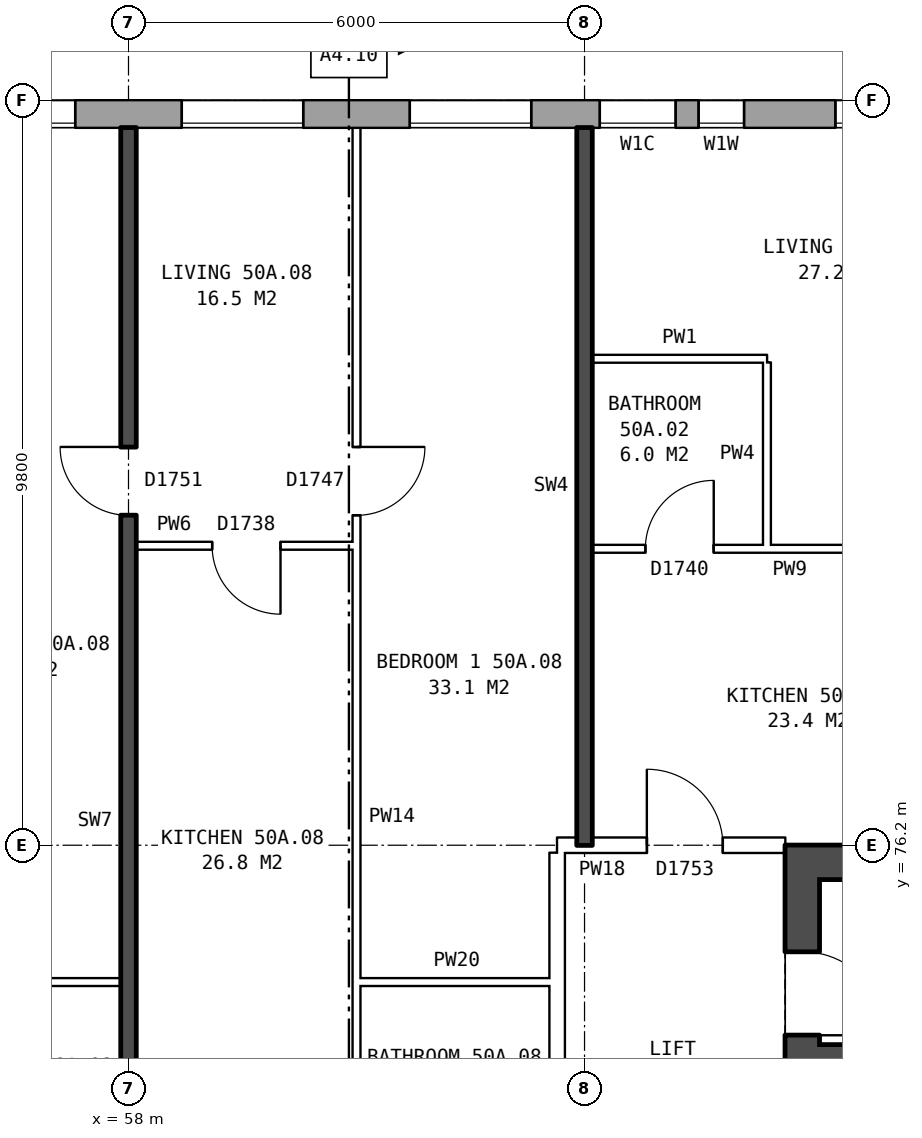
"""IFC4 building model, lengths in metres.
Left out: names, types, materials, properties, quantities, classifications, styles, units other than length and angle.
Written with IfcOpenShell. Run it as: python <this file> out.ifc"""

import sys

from ifc_helpers import new_model, si_unit, direction, frame, frame_2d, origin, place, context, subcontext, project, spatial, rectangle, extrude, element, fill, save


model = new_model("IFC4")
c1 = context("Model", 3, precision=1e-05, world=origin(), true_north=direction((0.0, 1.0)))
c2 = subcontext(c1, "Body", "Model", "MODEL_VIEW")
j1 = project(units=[si_unit("LENGTHUNIT", "METRE"), si_unit("PLANEANGLEUNIT", "RADIAN")], contexts=[c1])
p1 = place(None, origin())
s1 = spatial("IfcSite", under=j1, at=p1, CompositionType="ELEMENT")
p2 = place(p1, origin())
s2 = spatial("IfcBuilding", under=s1, at=p2, CompositionType="ELEMENT")
p3 = place(p2, frame((0.0, 0.0, 178.9)))
s3 = spatial("IfcBuildingStorey", under=s2, at=p3, CompositionType="ELEMENT", Elevation=178.9)
p4 = place(p3, frame((72.925, 85.82, 0.0), z_axis=(0.0, 0.0, 1.0), x_axis=(-1.0, 0.0, 0.0)))
e1 = element("IfcWall", 1, at=p4, inside=s3, PredefinedType="STANDARD", context=c2, shape_type="SweptSolid", body=[
    extrude(rectangle(XDim=39.601, YDim=0.36, at=frame_2d((19.8, 0.0))), origin(), (0.0, 0.0, 1.0), 2.85),
])
p5 = place(p4, frame((0.625, 0.0, 0.8)))
e2 = element("IfcOpeningElement", 2, at=p5, cuts=e1, PredefinedType="OPENING", context=c2, shape_type="SweptSolid", body=[
    extrude(rectangle(XDim=1.6, YDim=1.8, at=frame_2d((0.8, 0.9))), frame((0.0, 0.19, 0.0), z_axis=(0.0, -1.0, 0.0), x_axis=(1.0, 0.0, 0.0)), (0.0, 0.0, 1.0), 0.38),
])
p6 = place(p4, frame((3.125, 0.0, 0.8)))
e3 = element("IfcOpeningElement", 3, at=p6, cuts=e1, PredefinedType="OPENING", context=c2, shape_type="SweptSolid", body=[
    extrude(rectangle(XDim=1.6, YDim=1.8, at=frame_2d((0.8, 0.9))), frame((0.0, 0.19, 0.0), z_axis=(0.0, -1.0, 0.0), x_axis=(1.0, 0.0, 0.0)), (0.0, 0.0, 1.0), 0.38),
])
p7 = place(p4, frame((5.025, 0.0, 1.7)))
e4 = element("IfcOpeningElement", 4, at=p7, cuts=e1, PredefinedType="OPENING", context=c2, shape_type="SweptSolid", body=[
    extrude(rectangle(XDim=0.6, YDim=0.9, at=frame_2d((0.3, 0.45))), frame((0.0, 0.19, 0.0), z_axis=(0.0, -1.0, 0.0), x_axis=(1.0, 0.0, 0.0)), (0.0, 0.0, 1.0), 0.38),
])
p8 = place(p4, frame((9.625, 0.0, 0.8)))
e5 = element("IfcOpeningElement", 5, at=p8, cuts=e1, PredefinedType="OPENING", context=c2, shape_type="SweptSolid", body=[
    extrude(rectangle(XDim=1.6, YDim=1.8, at=frame_2d((0.8, 0.9))), frame((0.0, 0.19, 0.0), z_axis=(0.0, -1.0, 0.0), x_axis=(1.0, 0.0, 0.0)), (0.0, 0.0, 1.0), 0.38),
])
p9 = place(p4, frame((12.625, 0.0, 0.8)))
e6 = element("IfcOpeningElement", 6, at=p9, cuts=e1, PredefinedType="OPENING", context=c2, shape_type="SweptSolid", body=[
    extrude(rectangle(XDim=1.6, YDim=1.8, at=frame_2d((0.8, 0.9))), frame((0.0, 0.19, 0.0), z_axis=(0.0, -1.0, 0.0), x_axis=(1.0, 0.0, 0.0)), (0.0, 0.0, 1.0), 0.38),
])
p10 = place(p4, frame((15.625, 0.0, 0.8)))
e7 = element("IfcOpeningElement", 7, at=p10, cuts=e1, PredefinedType="OPENING", context=c2, shape_type="SweptSolid", body=[
    extrude(rectangle(XDim=1.6, YDim=1.8, at=frame_2d((0.8, 0.9))), frame((0.0, 0.19, 0.0), z_axis=(0.0, -1.0, 0.0), x_axis=(1.0, 0.0, 0.0)), (0.0, 0.0, 1.0), 0.38),
])
p11 = place(p4, frame((18.625, 0.0, 0.8)))
e8 = element("IfcOpeningElement", 8, at=p11, cuts=e1, PredefinedType="OPENING", context=c2, shape_type="SweptSolid", body=[
    extrude(rectangle(XDim=1.6, YDim=1.8, at=frame_2d((0.8, 0.9))), frame((0.0, 0.19, 0.0), z_axis=(0.0, -1.0, 0.0), x_axis=(1.0, 0.0, 0.0)), (0.0, 0.0, 1.0), 0.38),
])
p12 = place(p4, frame((21.625, 0.0, 0.8)))
e9 = element("IfcOpeningElement", 9, at=p12, cuts=e1, PredefinedType="OPENING", context=c2, shape_type="SweptSolid", body=[
    extrude(rectangle(XDim=1.6, YDim=1.8, at=frame_2d((0.8, 0.9))), frame((0.0, 0.19, 0.0), z_axis=(0.0, -1.0, 0.0), x_axis=(1.0, 0.0, 0.0)), (0.0, 0.0, 1.0), 0.38),
])
p13 = place(p4, frame((24.625, 0.0, 0.8)))
e10 = element("IfcOpeningElement", 10, at=p13, cuts=e1, PredefinedType="OPENING", context=c2, shape_type="SweptSolid", body=[
    extrude(rectangle(XDim=1.6, YDim=1.8, at=frame_2d((0.8, 0.9))), frame((0.0, 0.19, 0.0), z_axis=(0.0, -1.0, 0.0), x_axis=(1.0, 0.0, 0.0)), (0.0, 0.0, 1.0), 0.38),
])
p14 = place(p4, frame((27.625, 0.0, 0.8)))
e11 = element("IfcOpeningElement", 11, at=p14, cuts=e1, PredefinedType="OPENING", context=c2, shape_type="SweptSolid", body=[
    extrude(rectangle(XDim=1.6, YDim=1.8, at=frame_2d((0.8, 0.9))), frame((0.0, 0.19, 0.0), z_axis=(0.0, -1.0, 0.0), x_axis=(1.0, 0.0, 0.0)), (0.0, 0.0, 1.0), 0.38),
])
p15 = place(p4, frame((30.625, 0.0, 0.8)))
e12 = element("IfcOpeningElement", 12, at=p15, cuts=e1, PredefinedType="OPENING", context=c2, shape_type="SweptSolid", body=[
    extrude(rectangle(XDim=1.6, YDim=1.8, at=frame_2d((0.8, 0.9))), frame((0.0, 0.19, 0.0), z_axis=(0.0, -1.0, 0.0), x_axis=(1.0, 0.0, 0.0)), (0.0, 0.0, 1.0), 0.38),
])
p16 = place(p4, frame((33.925, 0.0, 1.7)))
e13 = element("IfcOpeningElement", 13, at=p16, cuts=e1, PredefinedType="OPENING", context=c2, shape_type="SweptSolid", body=[
    extrude(rectangle(XDim=0.6, YDim=0.9, at=frame_2d((0.3, 0.45))), frame((0.0, 0.19, 0.0), z_axis=(0.0, -1.0, 0.0), x_axis=(1.0, 0.0, 0.0)), (0.0, 0.0, 1.0), 0.38),
])
p17 = place(p4, frame((36.625, 0.0, 0.8)))
e14 = element("IfcOpeningElement", 14, at=p17, cuts=e1, PredefinedType="OPENING", context=c2, shape_type="SweptSolid", body=[
    extrude(rectangle(XDim=1.6, YDim=1.8, at=frame_2d((0.8, 0.9))), frame((0.0, 0.19, 0.0), z_axis=(0.0, -1.0, 0.0), x_axis=(1.0, 0.0, 0.0)), (0.0, 0.0, 1.0), 0.38),
])
p18 = place(p4, frame((6.825, 0.0, 0.8)))
e15 = element("IfcOpeningElement", 15, at=p18, cuts=e1, PredefinedType="OPENING", context=c2, shape_type="SweptSolid", body=[
    extrude(rectangle(XDim=0.6, YDim=0.9, at=frame_2d((0.3, 0.45))), frame((0.0, 0.19, 0.0), z_axis=(0.0, -1.0, 0.0), x_axis=(1.0, 0.0, 0.0)), (0.0, 0.0, 1.0), 0.38),
])
p19 = place(p4, frame((7.725, 0.0, 0.8)))
e16 = element("IfcOpeningElement", 16, at=p19, cuts=e1, PredefinedType="OPENING", context=c2, shape_type="SweptSolid", body=[
    extrude(rectangle(XDim=1.0, YDim=1.8, at=frame_2d((0.5, 0.9))), frame((0.0, 0.19, 0.0), z_axis=(0.0, -1.0, 0.0), x_axis=(1.0, 0.0, 0.0)), (0.0, 0.0, 1.0), 0.38),
])
p20 = place(p4, frame((34.825, 0.0, 0.8)))
e17 = element("IfcOpeningElement", 17, at=p20, cuts=e1, PredefinedType="OPENING", context=c2, shape_type="SweptSolid", body=[
    extrude(rectangle(XDim=1.4, YDim=1.8, at=frame_2d((0.7, 0.9))), frame((0.0, 0.19, 0.0), z_axis=(0.0, -1.0, 0.0), x_axis=(1.0, 0.0, 0.0)), (0.0, 0.0, 1.0), 0.38),
])
p21 = place(p3, frame((66.865, 63.8, 0.0), z_axis=(0.0, 0.0, 1.0), x_axis=(0.0, 1.0, 0.0)))
e18 = element("IfcWall", 18, at=p21, inside=s3, PredefinedType="SHEAR", context=c2, shape_type="SweptSolid", body=[
    extrude(rectangle(XDim=12.4, YDim=0.45, at=frame_2d((6.2, 0.0))), origin(), (0.0, 0.0, 1.0), 2.85),
])
p22 = place(p21, frame((1.325, 0.0, 0.0)))
e19 = element("IfcOpeningElement", 19, at=p22, cuts=e18, PredefinedType="OPENING", context=c2, shape_type="SweptSolid", body=[
    extrude(rectangle(XDim=1.1, YDim=2.1, at=frame_2d((0.55, 1.05))), frame((0.0, 0.235, 0.0), z_axis=(0.0, -1.0, 0.0), x_axis=(1.0, 0.0, 0.0)), (0.0, 0.0, 1.0), 0.47),
])
p23 = place(p21, frame((3.6, 0.0, 0.0)))
e20 = element("IfcOpeningElement", 20, at=p23, cuts=e18, PredefinedType="OPENING", context=c2, shape_type="SweptSolid", body=[
    extrude(rectangle(XDim=1.1, YDim=2.1, at=frame_2d((0.55, 1.05))), frame((0.0, 0.235, 0.0), z_axis=(0.0, -1.0, 0.0), x_axis=(1.0, 0.0, 0.0)), (0.0, 0.0, 1.0), 0.47),
])
p24 = place(p21, frame((5.8, 0.0, 0.0)))
e21 = element("IfcOpeningElement", 21, at=p24, cuts=e18, PredefinedType="OPENING", context=c2, shape_type="SweptSolid", body=[
    extrude(rectangle(XDim=1.1, YDim=2.1, at=frame_2d((0.55, 1.05))), frame((0.0, 0.235, 0.0), z_axis=(0.0, -1.0, 0.0), x_axis=(1.0, 0.0, 0.0)), (0.0, 0.0, 1.0), 0.47),
])
p25 = place(p21, frame((8.0, 0.0, 0.0)))
e22 = element("IfcOpeningElement", 22, at=p25, cuts=e18, PredefinedType="OPENING", context=c2, shape_type="SweptSolid", body=[
    extrude(rectangle(XDim=1.1, YDim=2.1, at=frame_2d((0.55, 1.05))), frame((0.0, 0.235, 0.0), z_axis=(0.0, -1.0, 0.0), x_axis=(1.0, 0.0, 0.0)), (0.0, 0.0, 1.0), 0.47),
])
p26 = place(p21, frame((9.9, 0.0, 0.0)))
e23 = element("IfcOpeningElement", 23, at=p26, cuts=e18, PredefinedType="OPENING", context=c2, shape_type="SweptSolid", body=[
    extrude(rectangle(XDim=1.1, YDim=2.1, at=frame_2d((0.55, 1.05))), frame((0.0, 0.235, 0.0), z_axis=(0.0, -1.0, 0.0), x_axis=(1.0, 0.0, 0.0)), (0.0, 0.0, 1.0), 0.47),
])
p27 = place(p3, frame((67.09, 75.975, 0.0), z_axis=(0.0, 0.0, 1.0), x_axis=(1.0, 0.0, 0.0)))
e24 = element("IfcWall", 24, at=p27, inside=s3, PredefinedType="SHEAR", context=c2, shape_type="SweptSolid", body=[
    extrude(rectangle(XDim=8.1, YDim=0.45, at=frame_2d((4.05, 0.0))), origin(), (0.0, 0.0, 1.0), 2.85),
])
p28 = place(p3, frame((67.09, 73.45, 0.0), z_axis=(0.0, 0.0, 1.0), x_axis=(1.0, 0.0, 0.0)))
e25 = element("IfcWall", 25, at=p28, inside=s3, PredefinedType="SHEAR", context=c2, shape_type="SweptSolid", body=[
    extrude(rectangle(XDim=2.475, YDim=0.25, at=frame_2d((1.237, 0.0))), origin(), (0.0, 0.0, 1.0), 2.85),
])
p29 = place(p3, frame((63.64, 63.9, 0.0), z_axis=(0.0, 0.0, 1.0), x_axis=(0.0, 1.0, 0.0)))
e26 = element("IfcWall", 26, at=p29, inside=s3, PredefinedType="PARTITIONING", context=c2, shape_type="SweptSolid", body=[
    extrude(rectangle(XDim=12.2, YDim=0.2, at=frame_2d((6.1, 0.0))), origin(), (0.0, 0.0, 1.0), 2.85),
])
p30 = place(p29, frame((5.1, 0.0, 0.0)))
e27 = element("IfcOpeningElement", 27, at=p30, cuts=e26, PredefinedType="OPENING", context=c2, shape_type="SweptSolid", body=[
    extrude(rectangle(XDim=2.0, YDim=2.1, at=frame_2d((1.0, 1.05))), frame((0.0, 0.11, 0.0), z_axis=(0.0, -1.0, 0.0), x_axis=(1.0, 0.0, 0.0)), (0.0, 0.0, 1.0), 0.22),
])
p31 = place(p3, frame((55.1, 74.4, 0.0), z_axis=(0.0, 0.0, 1.0), x_axis=(1.0, 0.0, 0.0)))
e28 = element("IfcWall", 28, at=p31, inside=s3, PredefinedType="PARTITIONING", context=c2, shape_type="SweptSolid", body=[
    extrude(rectangle(XDim=2.8, YDim=0.1, at=frame_2d((1.4, 0.0))), origin(), (0.0, 0.0, 1.0), 2.85),
])
p32 = place(p3, frame((61.0, 74.4, 0.0), z_axis=(0.0, 0.0, 1.0), x_axis=(1.0, 0.0, 0.0)))
e29 = element("IfcWall", 29, at=p32, inside=s3, PredefinedType="PARTITIONING", context=c2, shape_type="SweptSolid", body=[
    extrude(rectangle(XDim=2.64, YDim=0.1, at=frame_2d((1.32, 0.0))), origin(), (0.0, 0.0, 1.0), 2.85),
])
p33 = place(p3, frame((63.64, 76.2, 0.0), z_axis=(0.0, 0.0, 1.0), x_axis=(1.0, 0.0, 0.0)))
e30 = element("IfcWall", 30, at=p33, inside=s3, PredefinedType="PARTITIONING", context=c2, shape_type="SweptSolid", body=[
    extrude(rectangle(XDim=3.0, YDim=0.2, at=frame_2d((1.5, 0.0))), origin(), (0.0, 0.0, 1.0), 2.85),
])
p34 = place(p33, frame((1.18, 0.0, 0.0)))
e31 = element("IfcOpeningElement", 31, at=p34, cuts=e30, PredefinedType="OPENING", context=c2, shape_type="SweptSolid", body=[
    extrude(rectangle(XDim=1.0, YDim=2.1, at=frame_2d((0.5, 1.05))), frame((0.0, 0.11, 0.0), z_axis=(0.0, -1.0, 0.0), x_axis=(1.0, 0.0, 0.0)), (0.0, 0.0, 1.0), 0.22),
])
p35 = place(p3, frame((64.1, 80.1, 0.0), z_axis=(0.0, 0.0, 1.0), x_axis=(1.0, 0.0, 0.0)))
e32 = element("IfcWall", 32, at=p35, inside=s3, PredefinedType="PARTITIONING", context=c2, shape_type="SweptSolid", body=[
    extrude(rectangle(XDim=5.8, YDim=0.1, at=frame_2d((2.9, 0.0))), origin(), (0.0, 0.0, 1.0), 2.85),
])
p36 = place(p35, frame((3.6, 0.0, 0.0)))
e33 = element("IfcOpeningElement", 33, at=p36, cuts=e32, PredefinedType="OPENING", context=c2, shape_type="SweptSolid", body=[
    extrude(rectangle(XDim=0.9, YDim=2.1, at=frame_2d((0.45, 1.05))), frame((0.0, 0.06, 0.0), z_axis=(0.0, -1.0, 0.0), x_axis=(1.0, 0.0, 0.0)), (0.0, 0.0, 1.0), 0.12),
])
p37 = place(p35, frame((0.7, 0.0, 0.0)))
e34 = element("IfcOpeningElement", 34, at=p37, cuts=e32, PredefinedType="OPENING", context=c2, shape_type="SweptSolid", body=[
    extrude(rectangle(XDim=0.9, YDim=2.1, at=frame_2d((0.45, 1.05))), frame((0.0, 0.06, 0.0), z_axis=(0.0, -1.0, 0.0), x_axis=(1.0, 0.0, 0.0)), (0.0, 0.0, 1.0), 0.12),
])
p38 = place(p3, frame((58.1, 80.14, 0.0), z_axis=(0.0, 0.0, 1.0), x_axis=(1.0, 0.0, 0.0)))
e35 = element("IfcWall", 35, at=p38, inside=s3, PredefinedType="PARTITIONING", context=c2, shape_type="SweptSolid", body=[
    extrude(rectangle(XDim=2.9, YDim=0.1, at=frame_2d((1.45, 0.0))), origin(), (0.0, 0.0, 1.0), 2.85),
])
p39 = place(p38, frame((1.0, 0.0, 0.0)))
e36 = element("IfcOpeningElement", 36, at=p39, cuts=e35, PredefinedType="OPENING", context=c2, shape_type="SweptSolid", body=[
    extrude(rectangle(XDim=0.9, YDim=2.1, at=frame_2d((0.45, 1.05))), frame((0.0, 0.06, 0.0), z_axis=(0.0, -1.0, 0.0), x_axis=(1.0, 0.0, 0.0)), (0.0, 0.0, 1.0), 0.12),
])
p40 = place(p3, frame((64.1, 82.6, 0.0), z_axis=(0.0, 0.0, 1.0), x_axis=(1.0, 0.0, 0.0)))
e37 = element("IfcWall", 37, at=p40, inside=s3, PredefinedType="PARTITIONING", context=c2, shape_type="SweptSolid", body=[
    extrude(rectangle(XDim=2.3, YDim=0.1, at=frame_2d((1.15, 0.0))), origin(), (0.0, 0.0, 1.0), 2.85),
])
p41 = place(p3, frame((58.0, 71.2, 0.0), z_axis=(0.0, 0.0, 1.0), x_axis=(0.0, 1.0, 0.0)))
e38 = element("IfcWall", 38, at=p41, inside=s3, PredefinedType="SOLIDWALL", context=c2, shape_type="SweptSolid", body=[
    extrude(rectangle(XDim=14.44, YDim=0.2, at=frame_2d((7.22, 0.0))), origin(), (0.0, 0.0, 1.0), 2.85),
])
p42 = place(p41, frame((9.34, 0.0, 0.0)))
e39 = element("IfcOpeningElement", 39, at=p42, cuts=e38, PredefinedType="OPENING", context=c2, shape_type="SweptSolid", body=[
    extrude(rectangle(XDim=0.9, YDim=2.1, at=frame_2d((0.45, 1.05))), frame((0.0, 0.11, 0.0), z_axis=(0.0, -1.0, 0.0), x_axis=(1.0, 0.0, 0.0)), (0.0, 0.0, 1.0), 0.22),
])
p43 = place(p41, frame((0.4, 0.0, 0.0)))
e40 = element("IfcOpeningElement", 40, at=p43, cuts=e38, PredefinedType="OPENING", context=c2, shape_type="SweptSolid", body=[
    extrude(rectangle(XDim=0.9, YDim=2.1, at=frame_2d((0.45, 1.05))), frame((0.0, 0.11, 0.0), z_axis=(0.0, -1.0, 0.0), x_axis=(1.0, 0.0, 0.0)), (0.0, 0.0, 1.0), 0.22),
])
p44 = place(p3, frame((61.0, 71.3, 0.0), z_axis=(0.0, 0.0, 1.0), x_axis=(0.0, 1.0, 0.0)))
e41 = element("IfcWall", 41, at=p44, inside=s3, PredefinedType="PARTITIONING", context=c2, shape_type="SweptSolid", body=[
    extrude(rectangle(XDim=14.34, YDim=0.1, at=frame_2d((7.17, 0.0))), origin(), (0.0, 0.0, 1.0), 2.85),
])
p45 = place(p44, frame((9.24, 0.0, 0.0)))
e42 = element("IfcOpeningElement", 42, at=p45, cuts=e41, PredefinedType="OPENING", context=c2, shape_type="SweptSolid", body=[
    extrude(rectangle(XDim=0.9, YDim=2.1, at=frame_2d((0.45, 1.05))), frame((0.0, 0.06, 0.0), z_axis=(0.0, -1.0, 0.0), x_axis=(1.0, 0.0, 0.0)), (0.0, 0.0, 1.0), 0.12),
])
p46 = place(p44, frame((0.4, 0.0, 0.0)))
e43 = element("IfcOpeningElement", 43, at=p46, cuts=e41, PredefinedType="OPENING", context=c2, shape_type="SweptSolid", body=[
    extrude(rectangle(XDim=0.9, YDim=2.1, at=frame_2d((0.45, 1.05))), frame((0.0, 0.06, 0.0), z_axis=(0.0, -1.0, 0.0), x_axis=(1.0, 0.0, 0.0)), (0.0, 0.0, 1.0), 0.12),
])
p47 = place(p3, frame((64.0, 76.2, 0.0), z_axis=(0.0, 0.0, 1.0), x_axis=(0.0, 1.0, 0.0)))
e44 = element("IfcWall", 44, at=p47, inside=s3, PredefinedType="SOLIDWALL", context=c2, shape_type="SweptSolid", body=[
    extrude(rectangle(XDim=9.44, YDim=0.2, at=frame_2d((4.72, 0.0))), origin(), (0.0, 0.0, 1.0), 2.85),
])
p48 = place(p3, frame((66.4, 80.15, 0.0), z_axis=(0.0, 0.0, 1.0), x_axis=(0.0, 1.0, 0.0)))
e45 = element("IfcWall", 45, at=p48, inside=s3, PredefinedType="PARTITIONING", context=c2, shape_type="SweptSolid", body=[
    extrude(rectangle(XDim=2.4, YDim=0.1, at=frame_2d((1.2, 0.0))), origin(), (0.0, 0.0, 1.0), 2.85),
])
p49 = place(p7, origin())
e46 = element("IfcWindow", 46, at=p49, inside=s3, PartitioningType="SINGLE_PANEL", PredefinedType="WINDOW", context=c2, shape_type="SweptSolid", body=[
    extrude(rectangle(XDim=0.6, YDim=0.9, at=frame_2d((0.3, 0.45))), frame((0.0, 0.15, 0.0), z_axis=(0.0, -1.0, 0.0), x_axis=(1.0, 0.0, 0.0)), (0.0, 0.0, 1.0), 0.06),
])
fill(e4, e46)
p50 = place(p8, origin())
e47 = element("IfcWindow", 47, at=p50, inside=s3, PartitioningType="SINGLE_PANEL", PredefinedType="WINDOW", context=c2, shape_type="SweptSolid", body=[
    extrude(rectangle(XDim=1.6, YDim=1.8, at=frame_2d((0.8, 0.9))), frame((0.0, 0.15, 0.0), z_axis=(0.0, -1.0, 0.0), x_axis=(1.0, 0.0, 0.0)), (0.0, 0.0, 1.0), 0.06),
])
fill(e5, e47)
p51 = place(p9, origin())
e48 = element("IfcWindow", 48, at=p51, inside=s3, PartitioningType="SINGLE_PANEL", PredefinedType="WINDOW", context=c2, shape_type="SweptSolid", body=[
    extrude(rectangle(XDim=1.6, YDim=1.8, at=frame_2d((0.8, 0.9))), frame((0.0, 0.15, 0.0), z_axis=(0.0, -1.0, 0.0), x_axis=(1.0, 0.0, 0.0)), (0.0, 0.0, 1.0), 0.06),
])
fill(e6, e48)
p52 = place(p10, origin())
e49 = element("IfcWindow", 49, at=p52, inside=s3, PartitioningType="SINGLE_PANEL", PredefinedType="WINDOW", context=c2, shape_type="SweptSolid", body=[
    extrude(rectangle(XDim=1.6, YDim=1.8, at=frame_2d((0.8, 0.9))), frame((0.0, 0.15, 0.0), z_axis=(0.0, -1.0, 0.0), x_axis=(1.0, 0.0, 0.0)), (0.0, 0.0, 1.0), 0.06),
])
fill(e7, e49)
p53 = place(p26, frame((1.1, 0.0, 0.0), z_axis=(0.0, 0.0, 1.0), x_axis=(-1.0, 0.0, 0.0)))
e50 = element("IfcDoor", 50, at=p53, inside=s3, OperationType="SINGLE_SWING_RIGHT", PredefinedType="DOOR", context=c2, shape_type="SweptSolid", body=[
    extrude(rectangle(XDim=1.1, YDim=2.1, at=frame_2d((0.55, 1.05))), frame((0.0, 0.21, 0.0), z_axis=(0.0, -1.0, 0.0), x_axis=(1.0, 0.0, 0.0)), (0.0, 0.0, 1.0), 0.05),
])
fill(e23, e50)
p54 = place(p34, origin())
e51 = element("IfcDoor", 51, at=p54, inside=s3, OperationType="SINGLE_SWING_LEFT", PredefinedType="DOOR", context=c2, shape_type="SweptSolid", body=[
    extrude(rectangle(XDim=1.0, YDim=2.1, at=frame_2d((0.5, 1.05))), frame((0.0, 0.025, 0.0), z_axis=(0.0, -1.0, 0.0), x_axis=(1.0, 0.0, 0.0)), (0.0, 0.0, 1.0), 0.05),
])
fill(e31, e51)
p55 = place(p37, origin())
e52 = element("IfcDoor", 52, at=p55, inside=s3, OperationType="SINGLE_SWING_RIGHT", PredefinedType="DOOR", context=c2, shape_type="SweptSolid", body=[
    extrude(rectangle(XDim=0.9, YDim=2.1, at=frame_2d((0.45, 1.05))), frame((0.0, 0.025, 0.0), z_axis=(0.0, -1.0, 0.0), x_axis=(1.0, 0.0, 0.0)), (0.0, 0.0, 1.0), 0.05),
])
fill(e34, e52)
p56 = place(p45, frame((0.9, 0.0, 0.0), z_axis=(0.0, 0.0, 1.0), x_axis=(-1.0, 0.0, 0.0)))
e53 = element("IfcDoor", 53, at=p56, inside=s3, OperationType="SINGLE_SWING_LEFT", PredefinedType="DOOR", context=c2, shape_type="SweptSolid", body=[
    extrude(rectangle(XDim=0.9, YDim=2.1, at=frame_2d((0.45, 1.05))), frame((0.0, 0.025, 0.0), z_axis=(0.0, -1.0, 0.0), x_axis=(1.0, 0.0, 0.0)), (0.0, 0.0, 1.0), 0.05),
])
fill(e42, e53)
p57 = place(p42, origin())
e54 = element("IfcDoor", 54, at=p57, inside=s3, OperationType="SINGLE_SWING_RIGHT", PredefinedType="DOOR", context=c2, shape_type="SweptSolid", body=[
    extrude(rectangle(XDim=0.9, YDim=2.1, at=frame_2d((0.45, 1.05))), frame((0.0, 0.025, 0.0), z_axis=(0.0, -1.0, 0.0), x_axis=(1.0, 0.0, 0.0)), (0.0, 0.0, 1.0), 0.05),
])
fill(e39, e54)
p58 = place(p39, frame((0.9, 0.0, 0.0), z_axis=(0.0, 0.0, 1.0), x_axis=(-1.0, 0.0, 0.0)))
e55 = element("IfcDoor", 55, at=p58, inside=s3, OperationType="SINGLE_SWING_LEFT", PredefinedType="DOOR", context=c2, shape_type="SweptSolid", body=[
    extrude(rectangle(XDim=0.9, YDim=2.1, at=frame_2d((0.45, 1.05))), frame((0.0, 0.025, 0.0), z_axis=(0.0, -1.0, 0.0), x_axis=(1.0, 0.0, 0.0)), (0.0, 0.0, 1.0), 0.05),
])
fill(e36, e55)
p59 = place(p18, origin())
e56 = element("IfcWindow", 56, at=p59, inside=s3, PartitioningType="SINGLE_PANEL", PredefinedType="WINDOW", context=c2, shape_type="SweptSolid", body=[
    extrude(rectangle(XDim=0.6, YDim=0.9, at=frame_2d((0.3, 0.45))), frame((0.0, 0.15, 0.0), z_axis=(0.0, -1.0, 0.0), x_axis=(1.0, 0.0, 0.0)), (0.0, 0.0, 1.0), 0.06),
])
fill(e15, e56)
p60 = place(p19, origin())
e57 = element("IfcWindow", 57, at=p60, inside=s3, PartitioningType="SINGLE_PANEL", PredefinedType="WINDOW", context=c2, shape_type="SweptSolid", body=[
    extrude(rectangle(XDim=1.0, YDim=1.8, at=frame_2d((0.5, 0.9))), frame((0.0, 0.15, 0.0), z_axis=(0.0, -1.0, 0.0), x_axis=(1.0, 0.0, 0.0)), (0.0, 0.0, 1.0), 0.06),
])
fill(e16, e57)
save(model, sys.argv[1])
